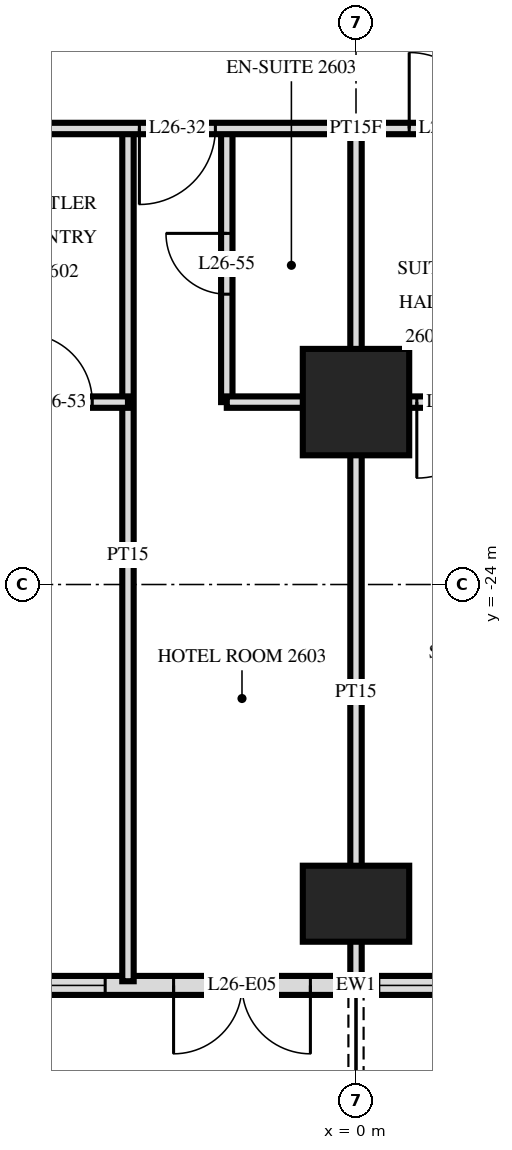
"""IFC4 building model, lengths in metres.
Left out: names, types, materials, properties, quantities, classifications, styles, units other than length and angle.
Written with IfcOpenShell. Run it as: python <this file> out.ifc"""

import sys

from ifc_helpers import new_model, si_unit, direction, frame, frame_2d, origin, origin_2d, place, context, subcontext, project, spatial, rectangle, extrude, element, fill, save


model = new_model("IFC4")
c1 = context("Model", 3, precision=1e-05, world=origin(), true_north=direction((0.0, 1.0)))
c2 = subcontext(c1, "Body", "Model", "MODEL_VIEW")
j1 = project(units=[si_unit("LENGTHUNIT", "METRE"), si_unit("PLANEANGLEUNIT", "RADIAN")], contexts=[c1])
p1 = place(None, origin())
s1 = spatial("IfcSite", under=j1, at=p1, CompositionType="ELEMENT")
p2 = place(p1, origin())
s2 = spatial("IfcBuilding", under=s1, at=p2, CompositionType="ELEMENT")
p3 = place(p2, frame((0.0, 0.0, 103.2)))
s3 = spatial("IfcBuildingStorey", under=s2, at=p3, CompositionType="ELEMENT", Elevation=103.2)
p4 = place(p3, frame((0.0, -28.2, 0.0), z_axis=(0.0, 0.0, 1.0), x_axis=(1.0, 0.0, 0.0)))
e1 = element("IfcColumn", 1, at=p4, inside=s3, PredefinedType="COLUMN", context=c2, shape_type="SweptSolid", body=[
    extrude(rectangle(XDim=1.4, YDim=1.0, at=origin_2d()), origin(), (0.0, 0.0, 1.0), 3.6),
])
p5 = place(p3, frame((0.0, -21.6, 0.0), z_axis=(0.0, 0.0, 1.0), x_axis=(1.0, 0.0, 0.0)))
e2 = element("IfcColumn", 2, at=p5, inside=s3, PredefinedType="COLUMN", context=c2, shape_type="SweptSolid", body=[
    extrude(rectangle(XDim=1.4, YDim=1.4, at=origin_2d()), origin(), (0.0, 0.0, 1.0), 3.6),
])
p6 = place(p3, frame((-28.775, -29.275, 0.0), z_axis=(0.0, 0.0, 1.0), x_axis=(1.0, 0.0, 0.0)))
e3 = element("IfcWall", 3, at=p6, inside=s3, PredefinedType="SOLIDWALL", context=c2, shape_type="SweptSolid", body=[
    extrude(rectangle(XDim=57.551, YDim=0.25, at=frame_2d((28.775, 0.0))), origin(), (0.0, 0.0, 1.0), 3.3),
])
p7 = place(p6, frame((0.575, 0.0, 0.0)))
e4 = element("IfcOpeningElement", 4, at=p7, cuts=e3, PredefinedType="OPENING", context=c2, shape_type="SweptSolid", body=[
    extrude(rectangle(XDim=1.8, YDim=2.4, at=frame_2d((0.9, 1.2))), frame((0.0, 0.135, 0.0), z_axis=(0.0, -1.0, 0.0), x_axis=(1.0, 0.0, 0.0)), (0.0, 0.0, 1.0), 0.27),
])
p8 = place(p6, frame((5.375, 0.0, 0.0)))
e5 = element("IfcOpeningElement", 5, at=p8, cuts=e3, PredefinedType="OPENING", context=c2, shape_type="SweptSolid", body=[
    extrude(rectangle(XDim=1.8, YDim=2.4, at=frame_2d((0.9, 1.2))), frame((0.0, 0.135, 0.0), z_axis=(0.0, -1.0, 0.0), x_axis=(1.0, 0.0, 0.0)), (0.0, 0.0, 1.0), 0.27),
])
p9 = place(p6, frame((8.075, 0.0, 0.3)))
e6 = element("IfcOpeningElement", 6, at=p9, cuts=e3, PredefinedType="OPENING", context=c2, shape_type="SweptSolid", body=[
    extrude(rectangle(XDim=2.4, YDim=2.1, at=frame_2d((1.2, 1.05))), frame((0.0, 0.135, 0.0), z_axis=(0.0, -1.0, 0.0), x_axis=(1.0, 0.0, 0.0)), (0.0, 0.0, 1.0), 0.27),
])
p10 = place(p6, frame((11.375, 0.0, 0.0)))
e7 = element("IfcOpeningElement", 7, at=p10, cuts=e3, PredefinedType="OPENING", context=c2, shape_type="SweptSolid", body=[
    extrude(rectangle(XDim=1.8, YDim=2.4, at=frame_2d((0.9, 1.2))), frame((0.0, 0.135, 0.0), z_axis=(0.0, -1.0, 0.0), x_axis=(1.0, 0.0, 0.0)), (0.0, 0.0, 1.0), 0.27),
])
p11 = place(p6, frame((14.075, 0.0, 0.3)))
e8 = element("IfcOpeningElement", 8, at=p11, cuts=e3, PredefinedType="OPENING", context=c2, shape_type="SweptSolid", body=[
    extrude(rectangle(XDim=2.4, YDim=2.1, at=frame_2d((1.2, 1.05))), frame((0.0, 0.135, 0.0), z_axis=(0.0, -1.0, 0.0), x_axis=(1.0, 0.0, 0.0)), (0.0, 0.0, 1.0), 0.27),
])
p12 = place(p6, frame((17.375, 0.0, 0.0)))
e9 = element("IfcOpeningElement", 9, at=p12, cuts=e3, PredefinedType="OPENING", context=c2, shape_type="SweptSolid", body=[
    extrude(rectangle(XDim=1.8, YDim=2.4, at=frame_2d((0.9, 1.2))), frame((0.0, 0.135, 0.0), z_axis=(0.0, -1.0, 0.0), x_axis=(1.0, 0.0, 0.0)), (0.0, 0.0, 1.0), 0.27),
])
p13 = place(p6, frame((20.075, 0.0, 0.3)))
e10 = element("IfcOpeningElement", 10, at=p13, cuts=e3, PredefinedType="OPENING", context=c2, shape_type="SweptSolid", body=[
    extrude(rectangle(XDim=2.4, YDim=2.1, at=frame_2d((1.2, 1.05))), frame((0.0, 0.135, 0.0), z_axis=(0.0, -1.0, 0.0), x_axis=(1.0, 0.0, 0.0)), (0.0, 0.0, 1.0), 0.27),
])
p14 = place(p6, frame((23.075, 0.0, 0.3)))
e11 = element("IfcOpeningElement", 11, at=p14, cuts=e3, PredefinedType="OPENING", context=c2, shape_type="SweptSolid", body=[
    extrude(rectangle(XDim=2.4, YDim=2.1, at=frame_2d((1.2, 1.05))), frame((0.0, 0.135, 0.0), z_axis=(0.0, -1.0, 0.0), x_axis=(1.0, 0.0, 0.0)), (0.0, 0.0, 1.0), 0.27),
])
p15 = place(p6, frame((26.375, 0.0, 0.0)))
e12 = element("IfcOpeningElement", 12, at=p15, cuts=e3, PredefinedType="OPENING", context=c2, shape_type="SweptSolid", body=[
    extrude(rectangle(XDim=1.8, YDim=2.4, at=frame_2d((0.9, 1.2))), frame((0.0, 0.135, 0.0), z_axis=(0.0, -1.0, 0.0), x_axis=(1.0, 0.0, 0.0)), (0.0, 0.0, 1.0), 0.27),
])
p16 = place(p6, frame((29.075, 0.0, 0.3)))
e13 = element("IfcOpeningElement", 13, at=p16, cuts=e3, PredefinedType="OPENING", context=c2, shape_type="SweptSolid", body=[
    extrude(rectangle(XDim=2.4, YDim=2.1, at=frame_2d((1.2, 1.05))), frame((0.0, 0.135, 0.0), z_axis=(0.0, -1.0, 0.0), x_axis=(1.0, 0.0, 0.0)), (0.0, 0.0, 1.0), 0.27),
])
p17 = place(p6, frame((32.375, 0.0, 0.0)))
e14 = element("IfcOpeningElement", 14, at=p17, cuts=e3, PredefinedType="OPENING", context=c2, shape_type="SweptSolid", body=[
    extrude(rectangle(XDim=1.8, YDim=2.4, at=frame_2d((0.9, 1.2))), frame((0.0, 0.135, 0.0), z_axis=(0.0, -1.0, 0.0), x_axis=(1.0, 0.0, 0.0)), (0.0, 0.0, 1.0), 0.27),
])
p18 = place(p6, frame((35.375, 0.0, 0.0)))
e15 = element("IfcOpeningElement", 15, at=p18, cuts=e3, PredefinedType="OPENING", context=c2, shape_type="SweptSolid", body=[
    extrude(rectangle(XDim=1.8, YDim=2.4, at=frame_2d((0.9, 1.2))), frame((0.0, 0.135, 0.0), z_axis=(0.0, -1.0, 0.0), x_axis=(1.0, 0.0, 0.0)), (0.0, 0.0, 1.0), 0.27),
])
p19 = place(p6, frame((38.075, 0.0, 0.3)))
e16 = element("IfcOpeningElement", 16, at=p19, cuts=e3, PredefinedType="OPENING", context=c2, shape_type="SweptSolid", body=[
    extrude(rectangle(XDim=2.4, YDim=2.1, at=frame_2d((1.2, 1.05))), frame((0.0, 0.135, 0.0), z_axis=(0.0, -1.0, 0.0), x_axis=(1.0, 0.0, 0.0)), (0.0, 0.0, 1.0), 0.27),
])
p20 = place(p6, frame((41.375, 0.0, 0.0)))
e17 = element("IfcOpeningElement", 17, at=p20, cuts=e3, PredefinedType="OPENING", context=c2, shape_type="SweptSolid", body=[
    extrude(rectangle(XDim=1.8, YDim=2.4, at=frame_2d((0.9, 1.2))), frame((0.0, 0.135, 0.0), z_axis=(0.0, -1.0, 0.0), x_axis=(1.0, 0.0, 0.0)), (0.0, 0.0, 1.0), 0.27),
])
p21 = place(p6, frame((44.075, 0.0, 0.3)))
e18 = element("IfcOpeningElement", 18, at=p21, cuts=e3, PredefinedType="OPENING", context=c2, shape_type="SweptSolid", body=[
    extrude(rectangle(XDim=2.4, YDim=2.1, at=frame_2d((1.2, 1.05))), frame((0.0, 0.135, 0.0), z_axis=(0.0, -1.0, 0.0), x_axis=(1.0, 0.0, 0.0)), (0.0, 0.0, 1.0), 0.27),
])
p22 = place(p6, frame((47.075, 0.0, 0.3)))
e19 = element("IfcOpeningElement", 19, at=p22, cuts=e3, PredefinedType="OPENING", context=c2, shape_type="SweptSolid", body=[
    extrude(rectangle(XDim=2.4, YDim=2.1, at=frame_2d((1.2, 1.05))), frame((0.0, 0.135, 0.0), z_axis=(0.0, -1.0, 0.0), x_axis=(1.0, 0.0, 0.0)), (0.0, 0.0, 1.0), 0.27),
])
p23 = place(p6, frame((50.375, 0.0, 0.0)))
e20 = element("IfcOpeningElement", 20, at=p23, cuts=e3, PredefinedType="OPENING", context=c2, shape_type="SweptSolid", body=[
    extrude(rectangle(XDim=1.8, YDim=2.4, at=frame_2d((0.9, 1.2))), frame((0.0, 0.135, 0.0), z_axis=(0.0, -1.0, 0.0), x_axis=(1.0, 0.0, 0.0)), (0.0, 0.0, 1.0), 0.27),
])
p24 = place(p6, frame((53.375, 0.0, 0.0)))
e21 = element("IfcOpeningElement", 21, at=p24, cuts=e3, PredefinedType="OPENING", context=c2, shape_type="SweptSolid", body=[
    extrude(rectangle(XDim=1.8, YDim=2.4, at=frame_2d((0.9, 1.2))), frame((0.0, 0.135, 0.0), z_axis=(0.0, -1.0, 0.0), x_axis=(1.0, 0.0, 0.0)), (0.0, 0.0, 1.0), 0.27),
])
p25 = place(p3, frame((0.0, -21.6, 0.0), z_axis=(0.0, 0.0, 1.0), x_axis=(0.0, 1.0, 0.0)))
e22 = element("IfcWall", 22, at=p25, inside=s3, PredefinedType="PARTITIONING", context=c2, shape_type="SweptSolid", body=[
    extrude(rectangle(XDim=3.6, YDim=0.15, at=frame_2d((1.8, 0.0))), origin(), (0.0, 0.0, 1.0), 3.32),
])
p26 = place(p3, frame((0.0, -29.22, 0.0), z_axis=(0.0, 0.0, 1.0), x_axis=(0.0, 1.0, 0.0)))
e23 = element("IfcWall", 23, at=p26, inside=s3, PredefinedType="PARTITIONING", context=c2, shape_type="SweptSolid", body=[
    extrude(rectangle(XDim=7.62, YDim=0.15, at=frame_2d((3.81, 0.0))), origin(), (0.0, 0.0, 1.0), 3.32),
])
p27 = place(p3, frame((-1.7, -21.6, 0.0), z_axis=(0.0, 0.0, 1.0), x_axis=(0.0, 1.0, 0.0)))
e24 = element("IfcWall", 24, at=p27, inside=s3, PredefinedType="PARTITIONING", context=c2, shape_type="SweptSolid", body=[
    extrude(rectangle(XDim=3.6, YDim=0.15, at=frame_2d((1.8, 0.0))), origin(), (0.0, 0.0, 1.0), 3.32),
])
p28 = place(p27, frame((1.42, 0.0, 0.0)))
e25 = element("IfcOpeningElement", 25, at=p28, cuts=e24, PredefinedType="OPENING", context=c2, shape_type="SweptSolid", body=[
    extrude(rectangle(XDim=0.8, YDim=2.1, at=frame_2d((0.4, 1.05))), frame((0.0, 0.085, 0.0), z_axis=(0.0, -1.0, 0.0), x_axis=(1.0, 0.0, 0.0)), (0.0, 0.0, 1.0), 0.17),
])
p29 = place(p3, frame((-3.0, -29.22, 0.0), z_axis=(0.0, 0.0, 1.0), x_axis=(0.0, 1.0, 0.0)))
e26 = element("IfcWall", 26, at=p29, inside=s3, PredefinedType="PARTITIONING", context=c2, shape_type="SweptSolid", body=[
    extrude(rectangle(XDim=11.22, YDim=0.15, at=frame_2d((5.61, 0.0))), origin(), (0.0, 0.0, 1.0), 3.32),
])
p30 = place(p3, frame((0.0, -21.6, 0.0), z_axis=(0.0, 0.0, 1.0), x_axis=(1.0, 0.0, 0.0)))
e27 = element("IfcWall", 27, at=p30, inside=s3, PredefinedType="PARTITIONING", context=c2, shape_type="SweptSolid", body=[
    extrude(rectangle(XDim=2.4, YDim=0.15, at=frame_2d((1.2, 0.0))), origin(), (0.0, 0.0, 1.0), 3.32),
])
p31 = place(p30, frame((0.8, 0.0, 0.0)))
e28 = element("IfcOpeningElement", 28, at=p31, cuts=e27, PredefinedType="OPENING", context=c2, shape_type="SweptSolid", body=[
    extrude(rectangle(XDim=1.0, YDim=2.1, at=frame_2d((0.5, 1.05))), frame((0.0, 0.085, 0.0), z_axis=(0.0, -1.0, 0.0), x_axis=(1.0, 0.0, 0.0)), (0.0, 0.0, 1.0), 0.17),
])
p32 = place(p3, frame((-10.8, -21.6, 0.0), z_axis=(0.0, 0.0, 1.0), x_axis=(1.0, 0.0, 0.0)))
e29 = element("IfcWall", 29, at=p32, inside=s3, PredefinedType="PARTITIONING", context=c2, shape_type="SweptSolid", body=[
    extrude(rectangle(XDim=7.8, YDim=0.15, at=frame_2d((3.9, 0.0))), origin(), (0.0, 0.0, 1.0), 3.32),
])
p33 = place(p32, frame((1.999, 0.0, 0.0)))
e30 = element("IfcOpeningElement", 30, at=p33, cuts=e29, PredefinedType="OPENING", context=c2, shape_type="SweptSolid", body=[
    extrude(rectangle(XDim=0.8, YDim=2.1, at=frame_2d((0.4, 1.05))), frame((0.0, 0.085, 0.0), z_axis=(0.0, -1.0, 0.0), x_axis=(1.0, 0.0, 0.0)), (0.0, 0.0, 1.0), 0.17),
])
p34 = place(p32, frame((3.1, 0.0, 0.0)))
e31 = element("IfcOpeningElement", 31, at=p34, cuts=e29, PredefinedType="OPENING", context=c2, shape_type="SweptSolid", body=[
    extrude(rectangle(XDim=0.9, YDim=2.1, at=frame_2d((0.45, 1.05))), frame((0.0, 0.085, 0.0), z_axis=(0.0, -1.0, 0.0), x_axis=(1.0, 0.0, 0.0)), (0.0, 0.0, 1.0), 0.17),
])
p35 = place(p32, frame((6.43, 0.0, 0.0)))
e32 = element("IfcOpeningElement", 32, at=p35, cuts=e29, PredefinedType="OPENING", context=c2, shape_type="SweptSolid", body=[
    extrude(rectangle(XDim=0.9, YDim=2.1, at=frame_2d((0.45, 1.05))), frame((0.0, 0.085, 0.0), z_axis=(0.0, -1.0, 0.0), x_axis=(1.0, 0.0, 0.0)), (0.0, 0.0, 1.0), 0.17),
])
p36 = place(p3, frame((-1.7, -21.6, 0.0), z_axis=(0.0, 0.0, 1.0), x_axis=(1.0, 0.0, 0.0)))
e33 = element("IfcWall", 33, at=p36, inside=s3, PredefinedType="PARTITIONING", context=c2, shape_type="SweptSolid", body=[
    extrude(rectangle(XDim=1.7, YDim=0.15, at=frame_2d((0.85, 0.0))), origin(), (0.0, 0.0, 1.0), 3.32),
])
p37 = place(p3, frame((-33.12, -18.0, 0.0), z_axis=(0.0, 0.0, 1.0), x_axis=(1.0, 0.0, 0.0)))
e34 = element("IfcWall", 34, at=p37, inside=s3, PredefinedType="PARTITIONING", context=c2, shape_type="SweptSolid", body=[
    extrude(rectangle(XDim=66.24, YDim=0.15, at=frame_2d((33.12, 0.0))), origin(), (0.0, 0.0, 1.0), 3.32),
])
p38 = place(p37, frame((14.02, 0.0, 0.0)))
e35 = element("IfcOpeningElement", 35, at=p38, cuts=e34, PredefinedType="OPENING", context=c2, shape_type="SweptSolid", body=[
    extrude(rectangle(XDim=1.0, YDim=2.1, at=frame_2d((0.5, 1.05))), frame((0.0, 0.085, 0.0), z_axis=(0.0, -1.0, 0.0), x_axis=(1.0, 0.0, 0.0)), (0.0, 0.0, 1.0), 0.17),
])
p39 = place(p37, frame((18.82, 0.0, 0.0)))
e36 = element("IfcOpeningElement", 36, at=p39, cuts=e34, PredefinedType="OPENING", context=c2, shape_type="SweptSolid", body=[
    extrude(rectangle(XDim=1.0, YDim=2.1, at=frame_2d((0.5, 1.05))), frame((0.0, 0.085, 0.0), z_axis=(0.0, -1.0, 0.0), x_axis=(1.0, 0.0, 0.0)), (0.0, 0.0, 1.0), 0.17),
])
p40 = place(p37, frame((30.27, 0.0, 0.0)))
e37 = element("IfcOpeningElement", 37, at=p40, cuts=e34, PredefinedType="OPENING", context=c2, shape_type="SweptSolid", body=[
    extrude(rectangle(XDim=1.0, YDim=2.1, at=frame_2d((0.5, 1.05))), frame((0.0, 0.085, 0.0), z_axis=(0.0, -1.0, 0.0), x_axis=(1.0, 0.0, 0.0)), (0.0, 0.0, 1.0), 0.17),
])
p41 = place(p37, frame((33.82, 0.0, 0.0)))
e38 = element("IfcOpeningElement", 38, at=p41, cuts=e34, PredefinedType="OPENING", context=c2, shape_type="SweptSolid", body=[
    extrude(rectangle(XDim=1.0, YDim=2.1, at=frame_2d((0.5, 1.05))), frame((0.0, 0.085, 0.0), z_axis=(0.0, -1.0, 0.0), x_axis=(1.0, 0.0, 0.0)), (0.0, 0.0, 1.0), 0.17),
])
p42 = place(p37, frame((46.27, 0.0, 0.0)))
e39 = element("IfcOpeningElement", 39, at=p42, cuts=e34, PredefinedType="OPENING", context=c2, shape_type="SweptSolid", body=[
    extrude(rectangle(XDim=1.0, YDim=2.1, at=frame_2d((0.5, 1.05))), frame((0.0, 0.085, 0.0), z_axis=(0.0, -1.0, 0.0), x_axis=(1.0, 0.0, 0.0)), (0.0, 0.0, 1.0), 0.17),
])
p43 = place(p37, frame((6.07, 0.0, 0.0)))
e40 = element("IfcOpeningElement", 40, at=p43, cuts=e34, PredefinedType="OPENING", context=c2, shape_type="SweptSolid", body=[
    extrude(rectangle(XDim=1.0, YDim=2.1, at=frame_2d((0.5, 1.05))), frame((0.0, 0.085, 0.0), z_axis=(0.0, -1.0, 0.0), x_axis=(1.0, 0.0, 0.0)), (0.0, 0.0, 1.0), 0.17),
])
p44 = place(p37, frame((60.37, 0.0, 0.0)))
e41 = element("IfcOpeningElement", 41, at=p44, cuts=e34, PredefinedType="OPENING", context=c2, shape_type="SweptSolid", body=[
    extrude(rectangle(XDim=1.0, YDim=2.1, at=frame_2d((0.5, 1.05))), frame((0.0, 0.085, 0.0), z_axis=(0.0, -1.0, 0.0), x_axis=(1.0, 0.0, 0.0)), (0.0, 0.0, 1.0), 0.17),
])
p45 = place(p14, origin())
e42 = element("IfcWindow", 42, at=p45, inside=s3, PartitioningType="SINGLE_PANEL", PredefinedType="WINDOW", context=c2, shape_type="SweptSolid", body=[
    extrude(rectangle(XDim=2.4, YDim=2.1, at=frame_2d((1.2, 1.05))), frame((0.0, 0.03, 0.0), z_axis=(0.0, -1.0, 0.0), x_axis=(1.0, 0.0, 0.0)), (0.0, 0.0, 1.0), 0.06),
])
fill(e11, e42)
p46 = place(p15, frame((0.9, 0.0, 0.0), z_axis=(0.0, 0.0, 1.0), x_axis=(-1.0, 0.0, 0.0)))
e43 = element("IfcDoor", 43, at=p46, inside=s3, OperationType="DOUBLE_DOOR_SINGLE_SWING", PredefinedType="DOOR", context=c2, shape_type="SweptSolid", body=[
    extrude(rectangle(XDim=1.8, YDim=2.4, at=frame_2d((0.0, 1.2))), frame((0.0, -0.025, 0.0), z_axis=(0.0, 1.0, 0.0), x_axis=(-1.0, 0.0, 0.0)), (0.0, 0.0, 1.0), 0.05),
])
fill(e12, e43)
p47 = place(p16, origin())
e44 = element("IfcWindow", 44, at=p47, inside=s3, PartitioningType="SINGLE_PANEL", PredefinedType="WINDOW", context=c2, shape_type="SweptSolid", body=[
    extrude(rectangle(XDim=2.4, YDim=2.1, at=frame_2d((1.2, 1.05))), frame((0.0, 0.03, 0.0), z_axis=(0.0, -1.0, 0.0), x_axis=(1.0, 0.0, 0.0)), (0.0, 0.0, 1.0), 0.06),
])
fill(e13, e44)
p48 = place(p40, frame((0.5, 0.0, 0.0), z_axis=(0.0, 0.0, 1.0), x_axis=(-1.0, 0.0, 0.0)))
e45 = element("IfcDoor", 45, at=p48, inside=s3, OperationType="SINGLE_SWING_LEFT", PredefinedType="DOOR", context=c2, shape_type="SweptSolid", body=[
    extrude(rectangle(XDim=1.0, YDim=2.1, at=frame_2d((0.0, 1.05))), frame((0.0, -0.025, 0.0), z_axis=(0.0, 1.0, 0.0), x_axis=(-1.0, 0.0, 0.0)), (0.0, 0.0, 1.0), 0.05),
])
fill(e37, e45)
p49 = place(p41, origin())
e46 = element("IfcDoor", 46, at=p49, inside=s3, OperationType="SINGLE_SWING_RIGHT", PredefinedType="DOOR", context=c2, shape_type="SweptSolid", body=[
    extrude(rectangle(XDim=1.0, YDim=2.1, at=frame_2d((0.5, 1.05))), frame((0.0, 0.025, 0.0), z_axis=(0.0, -1.0, 0.0), x_axis=(1.0, 0.0, 0.0)), (0.0, 0.0, 1.0), 0.05),
])
fill(e38, e46)
p50 = place(p35, origin())
e47 = element("IfcDoor", 47, at=p50, inside=s3, OperationType="SINGLE_SWING_RIGHT", PredefinedType="DOOR", context=c2, shape_type="SweptSolid", body=[
    extrude(rectangle(XDim=0.9, YDim=2.1, at=frame_2d((0.45, 1.05))), frame((0.0, 0.025, 0.0), z_axis=(0.0, -1.0, 0.0), x_axis=(1.0, 0.0, 0.0)), (0.0, 0.0, 1.0), 0.05),
])
fill(e32, e47)
p51 = place(p28, origin())
e48 = element("IfcDoor", 48, at=p51, inside=s3, OperationType="SINGLE_SWING_LEFT", PredefinedType="DOOR", context=c2, shape_type="SweptSolid", body=[
    extrude(rectangle(XDim=0.8, YDim=2.1, at=frame_2d((0.4, 1.05))), frame((0.0, 0.025, 0.0), z_axis=(0.0, -1.0, 0.0), x_axis=(1.0, 0.0, 0.0)), (0.0, 0.0, 1.0), 0.05),
])
fill(e25, e48)
p52 = place(p31, frame((0.5, 0.0, 0.0), z_axis=(0.0, 0.0, 1.0), x_axis=(-1.0, 0.0, 0.0)))
e49 = element("IfcDoor", 49, at=p52, inside=s3, OperationType="SINGLE_SWING_LEFT", PredefinedType="DOOR", context=c2, shape_type="SweptSolid", body=[
    extrude(rectangle(XDim=1.0, YDim=2.1, at=frame_2d((0.0, 1.05))), frame((0.0, -0.025, 0.0), z_axis=(0.0, 1.0, 0.0), x_axis=(-1.0, 0.0, 0.0)), (0.0, 0.0, 1.0), 0.05),
])
fill(e28, e49)
save(model, sys.argv[1])
